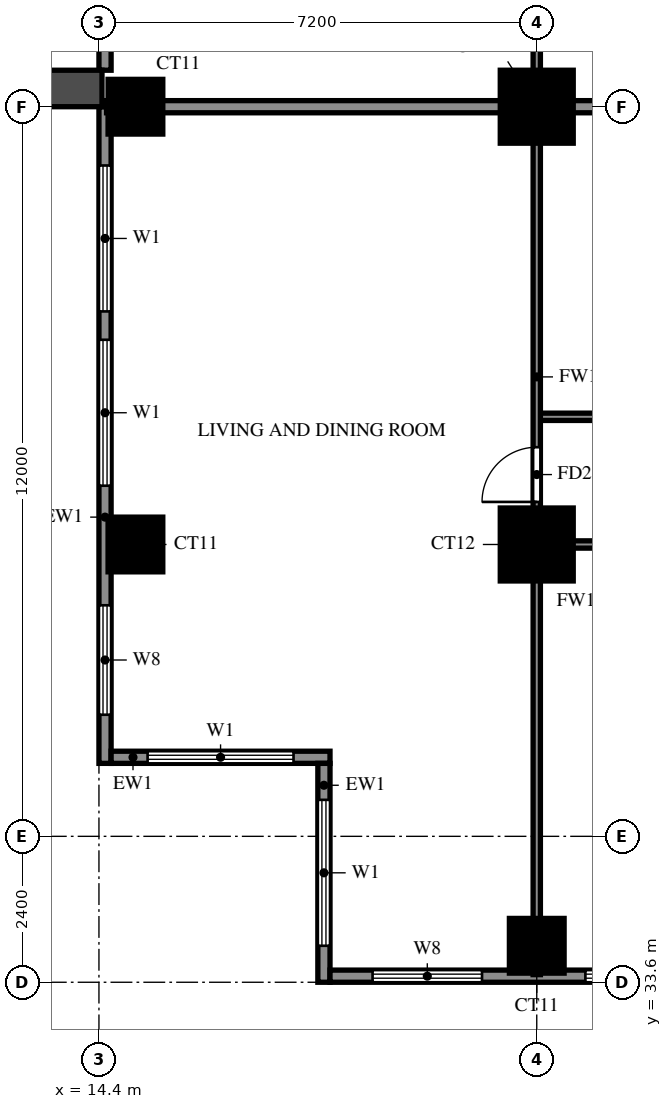
"""IFC4 building model, lengths in metres.
Left out: names, types, materials, properties, quantities, classifications, styles, units other than length and angle.
Written with IfcOpenShell. Run it as: python <this file> out.ifc"""

import sys

from ifc_helpers import new_model, si_unit, direction, frame, frame_2d, origin, origin_2d, place, context, subcontext, project, spatial, rectangle, extrude, source, transform, mapped, element, fill, save


model = new_model("IFC4")
c1 = context("Model", 3, precision=1e-05, world=origin(), true_north=direction((0.0, 1.0)))
c2 = subcontext(c1, "Body", "Model", "MODEL_VIEW")
j1 = project(units=[si_unit("LENGTHUNIT", "METRE"), si_unit("PLANEANGLEUNIT", "RADIAN")], contexts=[c1])
p1 = place(None, origin())
s1 = spatial("IfcSite", under=j1, at=p1, CompositionType="ELEMENT")
p2 = place(p1, origin())
s2 = spatial("IfcBuilding", under=s1, at=p2, CompositionType="ELEMENT")
p3 = place(p2, frame((0.0, 0.0, 100.5)))
s3 = spatial("IfcBuildingStorey", under=s2, at=p3, CompositionType="ELEMENT", Elevation=100.5)
m1 = source(origin(), c2, "Body", "SweptSolid", [
    extrude(rectangle(XDim=0.9, YDim=0.9, at=origin_2d()), origin(), (0.0, 0.0, 1.0), 3.18),
])
for number, where, z_axis, x_axis in (
    (1, (21.6, 34.2, 0.0), (0.0, 0.0, 1.0), (1.0, 0.0, 0.0)),
    (2, (15.0, 40.8, 0.0), (0.0, 0.0, 1.0), (1.0, 0.0, 0.0)),
):
    element("IfcColumn", number, at=place(p3, frame(where, z_axis=z_axis, x_axis=x_axis)), inside=s3, PredefinedType="COLUMN", context=c2, shape_type="MappedRepresentation", body=[
        mapped(m1, transform((0.0, 0.0, 0.0))),
    ])
m2 = source(origin(), c2, "Body", "SweptSolid", [
    extrude(rectangle(XDim=1.2, YDim=1.2, at=origin_2d()), origin(), (0.0, 0.0, 1.0), 3.18),
])
p4 = place(p3, frame((21.6, 40.8, 0.0), z_axis=(0.0, 0.0, 1.0), x_axis=(1.0, 0.0, 0.0)))
e3 = element("IfcColumn", 3, at=p4, inside=s3, PredefinedType="COLUMN", context=c2, shape_type="MappedRepresentation", body=[
    mapped(m2, transform((0.0, 0.0, 0.0))),
])
p5 = place(p3, frame((15.0, 48.0, 0.0), z_axis=(0.0, 0.0, 1.0), x_axis=(1.0, 0.0, 0.0)))
e4 = element("IfcColumn", 4, at=p5, inside=s3, PredefinedType="COLUMN", context=c2, shape_type="MappedRepresentation", body=[
    mapped(m1, transform((0.0, 0.0, 0.0))),
])
p6 = place(p3, frame((21.6, 48.0, 0.0), z_axis=(0.0, 0.0, 1.0), x_axis=(1.0, 0.0, 0.0)))
e5 = element("IfcColumn", 5, at=p6, inside=s3, PredefinedType="COLUMN", context=c2, shape_type="MappedRepresentation", body=[
    mapped(m2, transform((0.0, 0.0, 0.0))),
])
p7 = place(p3, frame((14.5, 54.6, 0.0), z_axis=(0.0, 0.0, 1.0), x_axis=(0.0, -1.0, 0.0)))
e6 = element("IfcWall", 6, at=p7, inside=s3, PredefinedType="SOLIDWALL", context=c2, shape_type="SweptSolid", body=[
    extrude(rectangle(XDim=6.0, YDim=0.2, at=frame_2d((3.0, 0.0))), origin(), (0.0, 0.0, 1.0), 3.18),
])
p8 = place(p7, frame((3.3, 0.0, 0.0)))
e7 = element("IfcOpeningElement", 7, at=p8, cuts=e6, PredefinedType="OPENING", context=c2, shape_type="SweptSolid", body=[
    extrude(rectangle(XDim=1.8, YDim=2.4, at=frame_2d((0.9, 1.2))), frame((0.0, 0.11, 0.0), z_axis=(0.0, -1.0, 0.0), x_axis=(1.0, 0.0, 0.0)), (0.0, 0.0, 1.0), 0.22),
])
p9 = place(p7, frame((1.15, 0.0, 1.5)))
e8 = element("IfcOpeningElement", 8, at=p9, cuts=e6, PredefinedType="OPENING", context=c2, shape_type="SweptSolid", body=[
    extrude(rectangle(XDim=0.9, YDim=0.9, at=frame_2d((0.45, 0.45))), frame((0.0, 0.11, 0.0), z_axis=(0.0, -1.0, 0.0), x_axis=(1.0, 0.0, 0.0)), (0.0, 0.0, 1.0), 0.22),
])
p10 = place(p3, frame((14.5, 48.0, 0.0), z_axis=(0.0, 0.0, 1.0), x_axis=(0.0, -1.0, 0.0)))
e9 = element("IfcWall", 9, at=p10, inside=s3, PredefinedType="SOLIDWALL", context=c2, shape_type="SweptSolid", body=[
    extrude(rectangle(XDim=10.8, YDim=0.2, at=frame_2d((5.4, 0.0))), origin(), (0.0, 0.0, 1.0), 3.18),
])
p11 = place(p10, frame((0.967, 0.0, 0.6)))
e10 = element("IfcOpeningElement", 10, at=p11, cuts=e9, PredefinedType="OPENING", context=c2, shape_type="SweptSolid", body=[
    extrude(rectangle(XDim=2.4, YDim=2.4, at=frame_2d((1.2, 1.2))), frame((0.0, 0.11, 0.0), z_axis=(0.0, -1.0, 0.0), x_axis=(1.0, 0.0, 0.0)), (0.0, 0.0, 1.0), 0.22),
])
p12 = place(p10, frame((3.833, 0.0, 0.6)))
e11 = element("IfcOpeningElement", 11, at=p12, cuts=e9, PredefinedType="OPENING", context=c2, shape_type="SweptSolid", body=[
    extrude(rectangle(XDim=2.4, YDim=2.4, at=frame_2d((1.2, 1.2))), frame((0.0, 0.11, 0.0), z_axis=(0.0, -1.0, 0.0), x_axis=(1.0, 0.0, 0.0)), (0.0, 0.0, 1.0), 0.22),
])
p13 = place(p10, frame((8.2, 0.0, 0.6)))
e12 = element("IfcOpeningElement", 12, at=p13, cuts=e9, PredefinedType="OPENING", context=c2, shape_type="SweptSolid", body=[
    extrude(rectangle(XDim=1.8, YDim=2.4, at=frame_2d((0.9, 1.2))), frame((0.0, 0.11, 0.0), z_axis=(0.0, -1.0, 0.0), x_axis=(1.0, 0.0, 0.0)), (0.0, 0.0, 1.0), 0.22),
])
p14 = place(p3, frame((14.6, 37.3, 0.0), z_axis=(0.0, 0.0, 1.0), x_axis=(1.0, 0.0, 0.0)))
e13 = element("IfcWall", 13, at=p14, inside=s3, PredefinedType="SOLIDWALL", context=c2, shape_type="SweptSolid", body=[
    extrude(rectangle(XDim=3.6, YDim=0.2, at=frame_2d((1.8, 0.0))), origin(), (0.0, 0.0, 1.0), 3.18),
])
p15 = place(p14, frame((0.6, 0.0, 0.6)))
e14 = element("IfcOpeningElement", 14, at=p15, cuts=e13, PredefinedType="OPENING", context=c2, shape_type="SweptSolid", body=[
    extrude(rectangle(XDim=2.4, YDim=2.4, at=frame_2d((1.2, 1.2))), frame((0.0, 0.11, 0.0), z_axis=(0.0, -1.0, 0.0), x_axis=(1.0, 0.0, 0.0)), (0.0, 0.0, 1.0), 0.22),
])
p16 = place(p3, frame((18.1, 37.2, 0.0), z_axis=(0.0, 0.0, 1.0), x_axis=(0.0, -1.0, 0.0)))
e15 = element("IfcWall", 15, at=p16, inside=s3, PredefinedType="SOLIDWALL", context=c2, shape_type="SweptSolid", body=[
    extrude(rectangle(XDim=3.6, YDim=0.2, at=frame_2d((1.8, 0.0))), origin(), (0.0, 0.0, 1.0), 3.18),
])
p17 = place(p16, frame((0.6, 0.0, 0.6)))
e16 = element("IfcOpeningElement", 16, at=p17, cuts=e15, PredefinedType="OPENING", context=c2, shape_type="SweptSolid", body=[
    extrude(rectangle(XDim=2.4, YDim=2.4, at=frame_2d((1.2, 1.2))), frame((0.0, 0.11, 0.0), z_axis=(0.0, -1.0, 0.0), x_axis=(1.0, 0.0, 0.0)), (0.0, 0.0, 1.0), 0.22),
])
p18 = place(p3, frame((18.2, 33.7, 0.0), z_axis=(0.0, 0.0, 1.0), x_axis=(1.0, 0.0, 0.0)))
e17 = element("IfcWall", 17, at=p18, inside=s3, PredefinedType="SOLIDWALL", context=c2, shape_type="SweptSolid", body=[
    extrude(rectangle(XDim=23.8, YDim=0.2, at=frame_2d((11.9, 0.0))), origin(), (0.0, 0.0, 1.0), 3.18),
])
p19 = place(p18, frame((0.7, 0.0, 0.6)))
e18 = element("IfcOpeningElement", 18, at=p19, cuts=e17, PredefinedType="OPENING", context=c2, shape_type="SweptSolid", body=[
    extrude(rectangle(XDim=1.8, YDim=2.4, at=frame_2d((0.9, 1.2))), frame((0.0, 0.11, 0.0), z_axis=(0.0, -1.0, 0.0), x_axis=(1.0, 0.0, 0.0)), (0.0, 0.0, 1.0), 0.22),
])
p20 = place(p18, frame((4.2, 0.0, 0.6)))
e19 = element("IfcOpeningElement", 19, at=p20, cuts=e17, PredefinedType="OPENING", context=c2, shape_type="SweptSolid", body=[
    extrude(rectangle(XDim=2.4, YDim=2.4, at=frame_2d((1.2, 1.2))), frame((0.0, 0.11, 0.0), z_axis=(0.0, -1.0, 0.0), x_axis=(1.0, 0.0, 0.0)), (0.0, 0.0, 1.0), 0.22),
])
p21 = place(p18, frame((8.15, 0.0, 1.5)))
e20 = element("IfcOpeningElement", 20, at=p21, cuts=e17, PredefinedType="OPENING", context=c2, shape_type="SweptSolid", body=[
    extrude(rectangle(XDim=0.9, YDim=0.9, at=frame_2d((0.45, 0.45))), frame((0.0, 0.11, 0.0), z_axis=(0.0, -1.0, 0.0), x_axis=(1.0, 0.0, 0.0)), (0.0, 0.0, 1.0), 0.22),
])
p22 = place(p18, frame((11.4, 0.0, 0.6)))
e21 = element("IfcOpeningElement", 21, at=p22, cuts=e17, PredefinedType="OPENING", context=c2, shape_type="SweptSolid", body=[
    extrude(rectangle(XDim=2.4, YDim=2.4, at=frame_2d((1.2, 1.2))), frame((0.0, 0.11, 0.0), z_axis=(0.0, -1.0, 0.0), x_axis=(1.0, 0.0, 0.0)), (0.0, 0.0, 1.0), 0.22),
])
p23 = place(p18, frame((15.35, 0.0, 1.5)))
e22 = element("IfcOpeningElement", 22, at=p23, cuts=e17, PredefinedType="OPENING", context=c2, shape_type="SweptSolid", body=[
    extrude(rectangle(XDim=0.9, YDim=0.9, at=frame_2d((0.45, 0.45))), frame((0.0, 0.11, 0.0), z_axis=(0.0, -1.0, 0.0), x_axis=(1.0, 0.0, 0.0)), (0.0, 0.0, 1.0), 0.22),
])
p24 = place(p18, frame((19.2, 0.0, 0.6)))
e23 = element("IfcOpeningElement", 23, at=p24, cuts=e17, PredefinedType="OPENING", context=c2, shape_type="SweptSolid", body=[
    extrude(rectangle(XDim=2.4, YDim=2.4, at=frame_2d((1.2, 1.2))), frame((0.0, 0.11, 0.0), z_axis=(0.0, -1.0, 0.0), x_axis=(1.0, 0.0, 0.0)), (0.0, 0.0, 1.0), 0.22),
])
p25 = place(p3, frame((14.45, 48.3, 0.0), z_axis=(0.0, 0.0, 1.0), x_axis=(-1.0, 0.0, 0.0)))
e24 = element("IfcWall", 24, at=p25, inside=s3, PredefinedType="SOLIDWALL", context=c2, shape_type="SweptSolid", body=[
    extrude(rectangle(XDim=2.75, YDim=0.6, at=frame_2d((1.375, 0.0))), origin(), (0.0, 0.0, 1.0), 2.85),
])
p26 = place(p3, frame((14.525, 48.0, 0.0), z_axis=(0.0, 0.0, 1.0), x_axis=(1.0, 0.0, 0.0)))
e25 = element("IfcWall", 25, at=p26, inside=s3, PredefinedType="SOLIDWALL", context=c2, shape_type="SweptSolid", body=[
    extrude(rectangle(XDim=19.075, YDim=0.2, at=frame_2d((9.538, 0.0))), origin(), (0.0, 0.0, 1.0), 3.18),
])
p27 = place(p3, frame((21.6, 40.8, 0.0), z_axis=(0.0, 0.0, 1.0), x_axis=(1.0, 0.0, 0.0)))
e26 = element("IfcWall", 26, at=p27, inside=s3, PredefinedType="PARTITIONING", context=c2, shape_type="SweptSolid", body=[
    extrude(rectangle(XDim=3.6, YDim=0.12, at=frame_2d((1.8, 0.0))), origin(), (0.0, 0.0, 1.0), 3.18),
])
p28 = place(p27, frame((1.35, 0.0, 0.0)))
e27 = element("IfcOpeningElement", 27, at=p28, cuts=e26, PredefinedType="OPENING", context=c2, shape_type="SweptSolid", body=[
    extrude(rectangle(XDim=0.9, YDim=2.1, at=frame_2d((0.45, 1.05))), frame((0.0, 0.07, 0.0), z_axis=(0.0, -1.0, 0.0), x_axis=(1.0, 0.0, 0.0)), (0.0, 0.0, 1.0), 0.14),
])
p29 = place(p3, frame((21.6, 42.9, 0.0), z_axis=(0.0, 0.0, 1.0), x_axis=(1.0, 0.0, 0.0)))
e28 = element("IfcWall", 28, at=p29, inside=s3, PredefinedType="PARTITIONING", context=c2, shape_type="SweptSolid", body=[
    extrude(rectangle(XDim=15.6, YDim=0.12, at=frame_2d((7.8, 0.0))), origin(), (0.0, 0.0, 1.0), 3.18),
])
p30 = place(p29, frame((2.1, 0.0, 0.0)))
e29 = element("IfcOpeningElement", 29, at=p30, cuts=e28, PredefinedType="OPENING", context=c2, shape_type="SweptSolid", body=[
    extrude(rectangle(XDim=0.9, YDim=2.1, at=frame_2d((0.45, 1.05))), frame((0.0, 0.07, 0.0), z_axis=(0.0, -1.0, 0.0), x_axis=(1.0, 0.0, 0.0)), (0.0, 0.0, 1.0), 0.14),
])
p31 = place(p29, frame((5.8, 0.0, 0.0)))
e30 = element("IfcOpeningElement", 30, at=p31, cuts=e28, PredefinedType="OPENING", context=c2, shape_type="SweptSolid", body=[
    extrude(rectangle(XDim=0.8, YDim=2.1, at=frame_2d((0.4, 1.05))), frame((0.0, 0.07, 0.0), z_axis=(0.0, -1.0, 0.0), x_axis=(1.0, 0.0, 0.0)), (0.0, 0.0, 1.0), 0.14),
])
p32 = place(p29, frame((9.2, 0.0, 0.0)))
e31 = element("IfcOpeningElement", 31, at=p32, cuts=e28, PredefinedType="OPENING", context=c2, shape_type="SweptSolid", body=[
    extrude(rectangle(XDim=0.9, YDim=2.1, at=frame_2d((0.45, 1.05))), frame((0.0, 0.07, 0.0), z_axis=(0.0, -1.0, 0.0), x_axis=(1.0, 0.0, 0.0)), (0.0, 0.0, 1.0), 0.14),
])
p33 = place(p29, frame((13.35, 0.0, 0.0)))
e32 = element("IfcOpeningElement", 32, at=p33, cuts=e28, PredefinedType="OPENING", context=c2, shape_type="SweptSolid", body=[
    extrude(rectangle(XDim=0.9, YDim=2.1, at=frame_2d((0.45, 1.05))), frame((0.0, 0.07, 0.0), z_axis=(0.0, -1.0, 0.0), x_axis=(1.0, 0.0, 0.0)), (0.0, 0.0, 1.0), 0.14),
])
p34 = place(p3, frame((21.6, 33.725, 0.0), z_axis=(0.0, 0.0, 1.0), x_axis=(0.0, 1.0, 0.0)))
e33 = element("IfcWall", 33, at=p34, inside=s3, PredefinedType="PARTITIONING", context=c2, shape_type="SweptSolid", body=[
    extrude(rectangle(XDim=17.875, YDim=0.12, at=frame_2d((8.938, 0.0))), origin(), (0.0, 0.0, 1.0), 3.18),
])
p35 = place(p34, frame((7.775, 0.0, 0.0)))
e34 = element("IfcOpeningElement", 34, at=p35, cuts=e33, PredefinedType="OPENING", context=c2, shape_type="SweptSolid", body=[
    extrude(rectangle(XDim=0.9, YDim=2.1, at=frame_2d((0.45, 1.05))), frame((0.0, 0.07, 0.0), z_axis=(0.0, -1.0, 0.0), x_axis=(1.0, 0.0, 0.0)), (0.0, 0.0, 1.0), 0.14),
])
p36 = place(p34, frame((15.625, 0.0, 0.0)))
e35 = element("IfcOpeningElement", 35, at=p36, cuts=e33, PredefinedType="OPENING", context=c2, shape_type="SweptSolid", body=[
    extrude(rectangle(XDim=0.9, YDim=2.1, at=frame_2d((0.45, 1.05))), frame((0.0, 0.07, 0.0), z_axis=(0.0, -1.0, 0.0), x_axis=(1.0, 0.0, 0.0)), (0.0, 0.0, 1.0), 0.14),
])
p37 = place(p11, origin())
e36 = element("IfcWindow", 36, at=p37, inside=s3, PartitioningType="DOUBLE_PANEL_VERTICAL", PredefinedType="WINDOW", context=c2, shape_type="SweptSolid", body=[
    extrude(rectangle(XDim=2.4, YDim=2.4, at=frame_2d((1.2, 1.2))), frame((0.0, 0.03, 0.0), z_axis=(0.0, -1.0, 0.0), x_axis=(1.0, 0.0, 0.0)), (0.0, 0.0, 1.0), 0.06),
])
fill(e10, e36)
p38 = place(p12, origin())
e37 = element("IfcWindow", 37, at=p38, inside=s3, PartitioningType="DOUBLE_PANEL_VERTICAL", PredefinedType="WINDOW", context=c2, shape_type="SweptSolid", body=[
    extrude(rectangle(XDim=2.4, YDim=2.4, at=frame_2d((1.2, 1.2))), frame((0.0, 0.03, 0.0), z_axis=(0.0, -1.0, 0.0), x_axis=(1.0, 0.0, 0.0)), (0.0, 0.0, 1.0), 0.06),
])
fill(e11, e37)
p39 = place(p13, origin())
e38 = element("IfcWindow", 38, at=p39, inside=s3, PartitioningType="DOUBLE_PANEL_VERTICAL", PredefinedType="WINDOW", context=c2, shape_type="SweptSolid", body=[
    extrude(rectangle(XDim=1.8, YDim=2.4, at=frame_2d((0.9, 1.2))), frame((0.0, 0.03, 0.0), z_axis=(0.0, -1.0, 0.0), x_axis=(1.0, 0.0, 0.0)), (0.0, 0.0, 1.0), 0.06),
])
fill(e12, e38)
p40 = place(p15, origin())
e39 = element("IfcWindow", 39, at=p40, inside=s3, PartitioningType="DOUBLE_PANEL_VERTICAL", PredefinedType="WINDOW", context=c2, shape_type="SweptSolid", body=[
    extrude(rectangle(XDim=2.4, YDim=2.4, at=frame_2d((1.2, 1.2))), frame((0.0, 0.03, 0.0), z_axis=(0.0, -1.0, 0.0), x_axis=(1.0, 0.0, 0.0)), (0.0, 0.0, 1.0), 0.06),
])
fill(e14, e39)
p41 = place(p17, origin())
e40 = element("IfcWindow", 40, at=p41, inside=s3, PartitioningType="DOUBLE_PANEL_VERTICAL", PredefinedType="WINDOW", context=c2, shape_type="SweptSolid", body=[
    extrude(rectangle(XDim=2.4, YDim=2.4, at=frame_2d((1.2, 1.2))), frame((0.0, 0.03, 0.0), z_axis=(0.0, -1.0, 0.0), x_axis=(1.0, 0.0, 0.0)), (0.0, 0.0, 1.0), 0.06),
])
fill(e16, e40)
p42 = place(p19, origin())
e41 = element("IfcWindow", 41, at=p42, inside=s3, PartitioningType="DOUBLE_PANEL_VERTICAL", PredefinedType="WINDOW", context=c2, shape_type="SweptSolid", body=[
    extrude(rectangle(XDim=1.8, YDim=2.4, at=frame_2d((0.9, 1.2))), frame((0.0, 0.03, 0.0), z_axis=(0.0, -1.0, 0.0), x_axis=(1.0, 0.0, 0.0)), (0.0, 0.0, 1.0), 0.06),
])
fill(e18, e41)
p43 = place(p20, origin())
e42 = element("IfcWindow", 42, at=p43, inside=s3, PartitioningType="DOUBLE_PANEL_VERTICAL", PredefinedType="WINDOW", context=c2, shape_type="SweptSolid", body=[
    extrude(rectangle(XDim=2.4, YDim=2.4, at=frame_2d((1.2, 1.2))), frame((0.0, 0.03, 0.0), z_axis=(0.0, -1.0, 0.0), x_axis=(1.0, 0.0, 0.0)), (0.0, 0.0, 1.0), 0.06),
])
fill(e19, e42)
p44 = place(p35, origin())
e43 = element("IfcDoor", 43, at=p44, inside=s3, OperationType="SINGLE_SWING_LEFT", PredefinedType="DOOR", context=c2, shape_type="SweptSolid", body=[
    extrude(rectangle(XDim=0.9, YDim=2.1, at=frame_2d((0.45, 1.05))), frame((0.0, 0.025, 0.0), z_axis=(0.0, -1.0, 0.0), x_axis=(1.0, 0.0, 0.0)), (0.0, 0.0, 1.0), 0.05),
])
fill(e34, e43)
save(model, sys.argv[1])
